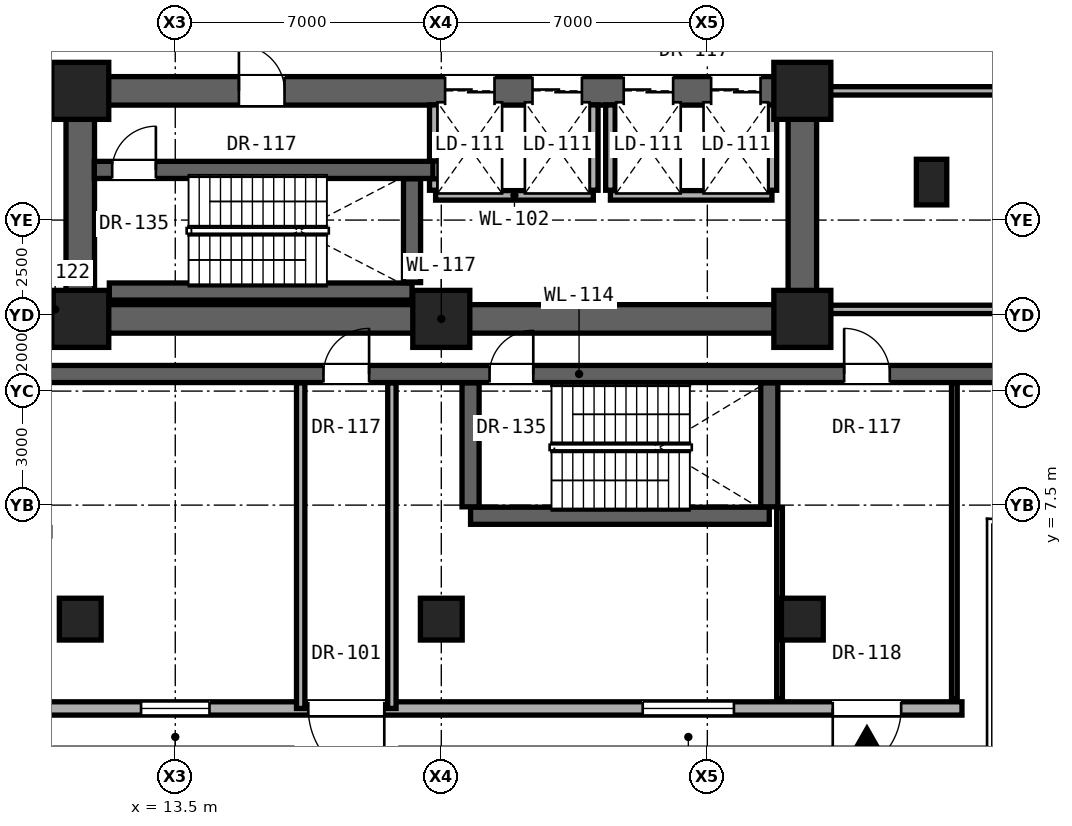
"""IFC4 building model, lengths in metres.
Left out: names, types, materials, properties, quantities, classifications, styles, units other than length and angle.
Written with IfcOpenShell. Run it as: python <this file> out.ifc"""

import sys

from ifc_helpers import new_model, si_unit, direction, frame, frame_2d, origin, origin_2d, place, context, subcontext, project, spatial, rectangle, extrude, element, fill, save


model = new_model("IFC4")
c1 = context("Model", 3, precision=1e-05, world=origin(), true_north=direction((0.0, 1.0)))
c2 = subcontext(c1, "Body", "Model", "MODEL_VIEW")
j1 = project(units=[si_unit("LENGTHUNIT", "METRE"), si_unit("PLANEANGLEUNIT", "RADIAN")], contexts=[c1])
p1 = place(None, origin())
s1 = spatial("IfcSite", under=j1, at=p1, CompositionType="ELEMENT")
p2 = place(p1, origin())
s2 = spatial("IfcBuilding", under=s1, at=p2, CompositionType="ELEMENT")
p3 = place(p2, origin())
s3 = spatial("IfcBuildingStorey", under=s2, at=p3, CompositionType="ELEMENT", Elevation=0.0)
for number, where, z_axis, x_axis in (
    (1, (11.0, 12.4, 0.0), (0.0, 0.0, 1.0), (1.0, 0.0, 0.0)),
    (2, (20.5, 12.4, 0.0), (0.0, 0.0, 1.0), (1.0, 0.0, 0.0)),
    (3, (30.0, 12.4, 0.0), (0.0, 0.0, 1.0), (1.0, 0.0, 0.0)),
    (4, (11.0, 18.4, 0.0), (0.0, 0.0, 1.0), (1.0, 0.0, 0.0)),
    (5, (30.0, 18.4, 0.0), (0.0, 0.0, 1.0), (1.0, 0.0, 0.0)),
):
    element("IfcColumn", number, at=place(p3, frame(where, z_axis=z_axis, x_axis=x_axis)), inside=s3, PredefinedType="COLUMN", context=c2, shape_type="SweptSolid", body=[
        extrude(rectangle(XDim=1.5, YDim=1.5, at=origin_2d()), origin(), (0.0, 0.0, 1.0), 5.2),
    ])
p4 = place(p3, frame((33.4, 16.0, 0.0), z_axis=(0.0, 0.0, 1.0), x_axis=(1.0, 0.0, 0.0)))
e6 = element("IfcColumn", 6, at=p4, inside=s3, PredefinedType="PILASTER", context=c2, shape_type="SweptSolid", body=[
    extrude(rectangle(XDim=0.8, YDim=1.2, at=origin_2d()), origin(), (0.0, 0.0, 1.0), 5.2),
])
p5 = place(p3, frame((11.0, 12.4, 0.0), z_axis=(0.0, 0.0, 1.0), x_axis=(1.0, 0.0, 0.0)))
e7 = element("IfcWall", 7, at=p5, inside=s3, PredefinedType="SHEAR", context=c2, shape_type="SweptSolid", body=[
    extrude(rectangle(XDim=19.0, YDim=0.75, at=frame_2d((9.5, 0.0))), origin(), (0.0, 0.0, 1.0), 4.88),
])
for number, where, z_axis, x_axis in (
    (8, (11.0, 12.4, 0.0), (0.0, 0.0, 1.0), (0.0, 1.0, 0.0)),
    (9, (30.0, 12.4, 0.0), (0.0, 0.0, 1.0), (0.0, 1.0, 0.0)),
):
    element("IfcWall", number, at=place(p3, frame(where, z_axis=z_axis, x_axis=x_axis)), inside=s3, PredefinedType="SHEAR", context=c2, shape_type="SweptSolid", body=[
        extrude(rectangle(XDim=6.0, YDim=0.75, at=frame_2d((3.0, 0.0))), origin(), (0.0, 0.0, 1.0), 4.88),
    ])
p6 = place(p3, frame((11.0, 18.4, 0.0), z_axis=(0.0, 0.0, 1.0), x_axis=(1.0, 0.0, 0.0)))
e10 = element("IfcWall", 10, at=p6, inside=s3, PredefinedType="SHEAR", context=c2, shape_type="SweptSolid", body=[
    extrude(rectangle(XDim=19.0, YDim=0.75, at=frame_2d((9.5, 0.0))), origin(), (0.0, 0.0, 1.0), 4.88),
])
p7 = place(p6, frame((4.175, 0.0, 0.0)))
e11 = element("IfcOpeningElement", 11, at=p7, cuts=e10, PredefinedType="OPENING", context=c2, shape_type="SweptSolid", body=[
    extrude(rectangle(XDim=1.2, YDim=2.25, at=frame_2d((0.6, 1.125))), frame((0.0, 0.385, 0.0), z_axis=(0.0, -1.0, 0.0), x_axis=(1.0, 0.0, 0.0)), (0.0, 0.0, 1.0), 0.77),
])
p8 = place(p6, frame((9.6, 0.0, 0.0)))
e12 = element("IfcOpeningElement", 12, at=p8, cuts=e10, PredefinedType="OPENING", context=c2, shape_type="SweptSolid", body=[
    extrude(rectangle(XDim=1.3, YDim=2.3, at=frame_2d((0.65, 1.15))), frame((0.0, 0.385, 0.0), z_axis=(0.0, -1.0, 0.0), x_axis=(1.0, 0.0, 0.0)), (0.0, 0.0, 1.0), 0.77),
])
p9 = place(p6, frame((11.9, 0.0, 0.0)))
e13 = element("IfcOpeningElement", 13, at=p9, cuts=e10, PredefinedType="OPENING", context=c2, shape_type="SweptSolid", body=[
    extrude(rectangle(XDim=1.3, YDim=2.3, at=frame_2d((0.65, 1.15))), frame((0.0, 0.385, 0.0), z_axis=(0.0, -1.0, 0.0), x_axis=(1.0, 0.0, 0.0)), (0.0, 0.0, 1.0), 0.77),
])
p10 = place(p6, frame((14.3, 0.0, 0.0)))
e14 = element("IfcOpeningElement", 14, at=p10, cuts=e10, PredefinedType="OPENING", context=c2, shape_type="SweptSolid", body=[
    extrude(rectangle(XDim=1.3, YDim=2.3, at=frame_2d((0.65, 1.15))), frame((0.0, 0.385, 0.0), z_axis=(0.0, -1.0, 0.0), x_axis=(1.0, 0.0, 0.0)), (0.0, 0.0, 1.0), 0.77),
])
p11 = place(p6, frame((16.6, 0.0, 0.0)))
e15 = element("IfcOpeningElement", 15, at=p11, cuts=e10, PredefinedType="OPENING", context=c2, shape_type="SweptSolid", body=[
    extrude(rectangle(XDim=1.3, YDim=2.3, at=frame_2d((0.65, 1.15))), frame((0.0, 0.385, 0.0), z_axis=(0.0, -1.0, 0.0), x_axis=(1.0, 0.0, 0.0)), (0.0, 0.0, 1.0), 0.77),
])
for number, where, z_axis, x_axis in (
    (16, (11.0, 4.5, 0.0), (0.0, 0.0, 1.0), (1.0, 0.0, 0.0)),
    (17, (20.5, 4.5, 0.0), (0.0, 0.0, 1.0), (1.0, 0.0, 0.0)),
    (18, (30.0, 4.5, 0.0), (0.0, 0.0, 1.0), (1.0, 0.0, 0.0)),
):
    element("IfcColumn", number, at=place(p3, frame(where, z_axis=z_axis, x_axis=x_axis)), inside=s3, PredefinedType="COLUMN", context=c2, shape_type="SweptSolid", body=[
        extrude(rectangle(XDim=1.1, YDim=1.1, at=origin_2d()), origin(), (0.0, 0.0, 1.0), 5.2),
    ])
p12 = place(p3, frame((34.2, 2.15, 0.0), z_axis=(0.0, 0.0, 1.0), x_axis=(-1.0, 0.0, 0.0)))
e19 = element("IfcWall", 19, at=p12, inside=s3, PredefinedType="SOLIDWALL", context=c2, shape_type="SweptSolid", body=[
    extrude(rectangle(XDim=27.0, YDim=0.35, at=frame_2d((13.5, 0.0))), origin(), (0.0, 0.0, 1.0), 4.86),
])
p13 = place(p12, frame((6.0, 0.0, 0.85)))
e20 = element("IfcOpeningElement", 20, at=p13, cuts=e19, PredefinedType="OPENING", context=c2, shape_type="SweptSolid", body=[
    extrude(rectangle(XDim=2.4, YDim=2.6, at=frame_2d((1.2, 1.3))), frame((0.0, 0.185, 0.0), z_axis=(0.0, -1.0, 0.0), x_axis=(1.0, 0.0, 0.0)), (0.0, 0.0, 1.0), 0.37),
])
p14 = place(p12, frame((19.8, 0.0, 0.85)))
e21 = element("IfcOpeningElement", 21, at=p14, cuts=e19, PredefinedType="OPENING", context=c2, shape_type="SweptSolid", body=[
    extrude(rectangle(XDim=1.8, YDim=2.4, at=frame_2d((0.9, 1.2))), frame((0.0, 0.185, 0.0), z_axis=(0.0, -1.0, 0.0), x_axis=(1.0, 0.0, 0.0)), (0.0, 0.0, 1.0), 0.37),
])
p15 = place(p12, frame((1.6, 0.0, 0.0)))
e22 = element("IfcOpeningElement", 22, at=p15, cuts=e19, PredefinedType="OPENING", context=c2, shape_type="SweptSolid", body=[
    extrude(rectangle(XDim=1.8, YDim=2.5, at=frame_2d((0.9, 1.25))), frame((0.0, 0.185, 0.0), z_axis=(0.0, -1.0, 0.0), x_axis=(1.0, 0.0, 0.0)), (0.0, 0.0, 1.0), 0.37),
])
p16 = place(p12, frame((15.2, 0.0, 0.0)))
e23 = element("IfcOpeningElement", 23, at=p16, cuts=e19, PredefinedType="OPENING", context=c2, shape_type="SweptSolid", body=[
    extrude(rectangle(XDim=2.0, YDim=2.4, at=frame_2d((1.0, 1.2))), frame((0.0, 0.185, 0.0), z_axis=(0.0, -1.0, 0.0), x_axis=(1.0, 0.0, 0.0)), (0.0, 0.0, 1.0), 0.37),
])
p17 = place(p12, frame((24.41, 0.0, 0.0)))
e24 = element("IfcOpeningElement", 24, at=p17, cuts=e19, PredefinedType="OPENING", context=c2, shape_type="SweptSolid", body=[
    extrude(rectangle(XDim=2.0, YDim=2.4, at=frame_2d((1.0, 1.2))), frame((0.0, 0.185, 0.0), z_axis=(0.0, -1.0, 0.0), x_axis=(1.0, 0.0, 0.0)), (0.0, 0.0, 1.0), 0.37),
])
p18 = place(p3, frame((21.27, 7.22, 0.0), z_axis=(0.0, 0.0, 1.0), x_axis=(1.0, 0.0, 0.0)))
e25 = element("IfcWall", 25, at=p18, inside=s3, PredefinedType="SHEAR", context=c2, shape_type="SweptSolid", body=[
    extrude(rectangle(XDim=7.86, YDim=0.45, at=frame_2d((3.93, 0.0))), origin(), (0.0, 0.0, 1.0), 4.88),
])
p19 = place(p3, frame((10.05, 10.95, 0.0), z_axis=(0.0, 0.0, 1.0), x_axis=(1.0, 0.0, 0.0)))
e26 = element("IfcWall", 26, at=p19, inside=s3, PredefinedType="SHEAR", context=c2, shape_type="SweptSolid", body=[
    extrude(rectangle(XDim=28.15, YDim=0.45, at=frame_2d((14.075, 0.0))), origin(), (0.0, 0.0, 1.0), 4.88),
])
p20 = place(p19, frame((7.35, 0.0, 0.0)))
e27 = element("IfcOpeningElement", 27, at=p20, cuts=e26, PredefinedType="OPENING", context=c2, shape_type="SweptSolid", body=[
    extrude(rectangle(XDim=1.2, YDim=2.25, at=frame_2d((0.6, 1.125))), frame((0.0, 0.235, 0.0), z_axis=(0.0, -1.0, 0.0), x_axis=(1.0, 0.0, 0.0)), (0.0, 0.0, 1.0), 0.47),
])
p21 = place(p19, frame((11.72, 0.0, 0.0)))
e28 = element("IfcOpeningElement", 28, at=p21, cuts=e26, PredefinedType="OPENING", context=c2, shape_type="SweptSolid", body=[
    extrude(rectangle(XDim=1.15, YDim=2.2, at=frame_2d((0.575, 1.1))), frame((0.0, 0.235, 0.0), z_axis=(0.0, -1.0, 0.0), x_axis=(1.0, 0.0, 0.0)), (0.0, 0.0, 1.0), 0.47),
])
p22 = place(p19, frame((21.05, 0.0, 0.0)))
e29 = element("IfcOpeningElement", 29, at=p22, cuts=e26, PredefinedType="OPENING", context=c2, shape_type="SweptSolid", body=[
    extrude(rectangle(XDim=1.2, YDim=2.25, at=frame_2d((0.6, 1.125))), frame((0.0, 0.235, 0.0), z_axis=(0.0, -1.0, 0.0), x_axis=(1.0, 0.0, 0.0)), (0.0, 0.0, 1.0), 0.47),
])
p23 = place(p3, frame((10.05, 12.65, 0.0), z_axis=(0.0, 0.0, 1.0), x_axis=(1.0, 0.0, 0.0)))
e30 = element("IfcWall", 30, at=p23, inside=s3, PredefinedType="SOLIDWALL", context=c2, shape_type="SweptSolid", body=[
    extrude(rectangle(XDim=0.58, YDim=0.22, at=frame_2d((0.29, 0.0))), origin(), (0.0, 0.0, 1.0), 4.88),
])
p24 = place(p3, frame((30.37, 12.65, 0.0), z_axis=(0.0, 0.0, 1.0), x_axis=(1.0, 0.0, 0.0)))
e31 = element("IfcWall", 31, at=p24, inside=s3, PredefinedType="SOLIDWALL", context=c2, shape_type="SweptSolid", body=[
    extrude(rectangle(XDim=7.83, YDim=0.22, at=frame_2d((3.915, 0.0))), origin(), (0.0, 0.0, 1.0), 3.924),
])
p25 = place(p3, frame((11.765, 13.12, 0.0), z_axis=(0.0, 0.0, 1.0), x_axis=(1.0, 0.0, 0.0)))
e32 = element("IfcWall", 32, at=p25, inside=s3, PredefinedType="SHEAR", context=c2, shape_type="SweptSolid", body=[
    extrude(rectangle(XDim=7.965, YDim=0.45, at=frame_2d((3.982, 0.0))), origin(), (0.0, 0.0, 1.0), 4.88),
])
p26 = place(p3, frame((20.35, 15.65, 0.0), z_axis=(0.0, 0.0, 1.0), x_axis=(1.0, 0.0, 0.0)))
e33 = element("IfcWall", 33, at=p26, inside=s3, PredefinedType="SOLIDWALL", context=c2, shape_type="SweptSolid", body=[
    extrude(rectangle(XDim=4.15, YDim=0.25, at=frame_2d((2.075, 0.0))), origin(), (0.0, 0.0, 1.0), 4.88),
])
p27 = place(p3, frame((24.95, 15.65, 0.0), z_axis=(0.0, 0.0, 1.0), x_axis=(1.0, 0.0, 0.0)))
e34 = element("IfcWall", 34, at=p27, inside=s3, PredefinedType="SOLIDWALL", context=c2, shape_type="SweptSolid", body=[
    extrude(rectangle(XDim=4.25, YDim=0.25, at=frame_2d((2.125, 0.0))), origin(), (0.0, 0.0, 1.0), 4.88),
])
p28 = place(p3, frame((11.37, 16.32, 0.0), z_axis=(0.0, 0.0, 1.0), x_axis=(1.0, 0.0, 0.0)))
e35 = element("IfcWall", 35, at=p28, inside=s3, PredefinedType="SHEAR", context=c2, shape_type="SweptSolid", body=[
    extrude(rectangle(XDim=8.91, YDim=0.45, at=frame_2d((4.455, 0.0))), origin(), (0.0, 0.0, 1.0), 4.88),
])
p29 = place(p28, frame((0.47, 0.0, 0.0)))
e36 = element("IfcOpeningElement", 36, at=p29, cuts=e35, PredefinedType="OPENING", context=c2, shape_type="SweptSolid", body=[
    extrude(rectangle(XDim=1.15, YDim=2.2, at=frame_2d((0.575, 1.1))), frame((0.0, 0.235, 0.0), z_axis=(0.0, -1.0, 0.0), x_axis=(1.0, 0.0, 0.0)), (0.0, 0.0, 1.0), 0.47),
])
p30 = place(p3, frame((10.05, 18.4, 0.0), z_axis=(0.0, 0.0, 1.0), x_axis=(1.0, 0.0, 0.0)))
e37 = element("IfcWall", 37, at=p30, inside=s3, PredefinedType="SOLIDWALL", context=c2, shape_type="SweptSolid", body=[
    extrude(rectangle(XDim=0.58, YDim=0.22, at=frame_2d((0.29, 0.0))), origin(), (0.0, 0.0, 1.0), 3.772),
])
p31 = place(p3, frame((30.37, 18.4, 0.0), z_axis=(0.0, 0.0, 1.0), x_axis=(1.0, 0.0, 0.0)))
e38 = element("IfcWall", 38, at=p31, inside=s3, PredefinedType="SOLIDWALL", context=c2, shape_type="SweptSolid", body=[
    extrude(rectangle(XDim=10.03, YDim=0.22, at=frame_2d((5.015, 0.0))), origin(), (0.0, 0.0, 1.0), 3.772),
])
for number, where, z_axis, x_axis in (
    (39, (16.8, 2.15, 0.0), (0.0, 0.0, 1.0), (0.0, 1.0, 0.0)),
    (40, (19.2, 2.15, 0.0), (0.0, 0.0, 1.0), (0.0, 1.0, 0.0)),
):
    element("IfcWall", number, at=place(p3, frame(where, z_axis=z_axis, x_axis=x_axis)), inside=s3, PredefinedType="SOLIDWALL", context=c2, shape_type="SweptSolid", body=[
        extrude(rectangle(XDim=8.565, YDim=0.22, at=frame_2d((4.283, 0.0))), origin(), (0.0, 0.0, 1.0), 4.099),
    ])
p32 = place(p3, frame((19.73, 13.355, 0.0), z_axis=(0.0, 0.0, 1.0), x_axis=(0.0, 1.0, 0.0)))
e41 = element("IfcWall", 41, at=p32, inside=s3, PredefinedType="SHEAR", context=c2, shape_type="SweptSolid", body=[
    extrude(rectangle(XDim=2.73, YDim=0.45, at=frame_2d((1.365, 0.0))), origin(), (0.0, 0.0, 1.0), 4.88),
])
p33 = place(p3, frame((20.315, 15.785, 0.0), z_axis=(0.0, 0.0, 1.0), x_axis=(0.0, 1.0, 0.0)))
e42 = element("IfcWall", 42, at=p33, inside=s3, PredefinedType="SOLIDWALL", context=c2, shape_type="SweptSolid", body=[
    extrude(rectangle(XDim=0.3, YDim=0.25, at=frame_2d((0.15, 0.0))), origin(), (0.0, 0.0, 1.0), 4.88),
])
p34 = place(p3, frame((20.315, 16.555, 0.0), z_axis=(0.0, 0.0, 1.0), x_axis=(0.0, 1.0, 0.0)))
e43 = element("IfcWall", 43, at=p34, inside=s3, PredefinedType="SOLIDWALL", context=c2, shape_type="SweptSolid", body=[
    extrude(rectangle(XDim=1.475, YDim=0.25, at=frame_2d((0.738, 0.0))), origin(), (0.0, 0.0, 1.0), 4.88),
])
p35 = place(p3, frame((21.27, 7.455, 0.0), z_axis=(0.0, 0.0, 1.0), x_axis=(0.0, 1.0, 0.0)))
e44 = element("IfcWall", 44, at=p35, inside=s3, PredefinedType="SHEAR", context=c2, shape_type="SweptSolid", body=[
    extrude(rectangle(XDim=3.26, YDim=0.45, at=frame_2d((1.63, 0.0))), origin(), (0.0, 0.0, 1.0), 4.88),
])
for number, where, z_axis, x_axis in (
    (45, (24.5, 15.785, 0.0), (0.0, 0.0, 1.0), (0.0, 1.0, 0.0)),
    (46, (24.95, 15.785, 0.0), (0.0, 0.0, 1.0), (0.0, 1.0, 0.0)),
):
    element("IfcWall", number, at=place(p3, frame(where, z_axis=z_axis, x_axis=x_axis)), inside=s3, PredefinedType="SOLIDWALL", context=c2, shape_type="SweptSolid", body=[
        extrude(rectangle(XDim=2.245, YDim=0.25, at=frame_2d((1.123, 0.0))), origin(), (0.0, 0.0, 1.0), 4.88),
    ])
p36 = place(p3, frame((29.13, 7.455, 0.0), z_axis=(0.0, 0.0, 1.0), x_axis=(0.0, 1.0, 0.0)))
e47 = element("IfcWall", 47, at=p36, inside=s3, PredefinedType="SHEAR", context=c2, shape_type="SweptSolid", body=[
    extrude(rectangle(XDim=3.26, YDim=0.45, at=frame_2d((1.63, 0.0))), origin(), (0.0, 0.0, 1.0), 4.88),
])
p37 = place(p3, frame((29.2, 15.785, 0.0), z_axis=(0.0, 0.0, 1.0), x_axis=(0.0, 1.0, 0.0)))
e48 = element("IfcWall", 48, at=p37, inside=s3, PredefinedType="SOLIDWALL", context=c2, shape_type="SweptSolid", body=[
    extrude(rectangle(XDim=2.245, YDim=0.25, at=frame_2d((1.123, 0.0))), origin(), (0.0, 0.0, 1.0), 4.88),
])
p38 = place(p3, frame((29.4, 2.4, 0.0), z_axis=(0.0, 0.0, 1.0), x_axis=(0.0, 1.0, 0.0)))
e49 = element("IfcWall", 49, at=p38, inside=s3, PredefinedType="PARTITIONING", context=c2, shape_type="SweptSolid", body=[
    extrude(rectangle(XDim=5.035, YDim=0.15, at=frame_2d((2.518, 0.0))), origin(), (0.0, 0.0, 1.0), 4.099),
])
p39 = place(p3, frame((34.0, 2.4, 0.0), z_axis=(0.0, 0.0, 1.0), x_axis=(0.0, 1.0, 0.0)))
e50 = element("IfcWall", 50, at=p39, inside=s3, PredefinedType="PARTITIONING", context=c2, shape_type="SweptSolid", body=[
    extrude(rectangle(XDim=8.315, YDim=0.15, at=frame_2d((4.158, 0.0))), origin(), (0.0, 0.0, 1.0), 4.099),
])
p40 = place(p13, origin())
e51 = element("IfcWindow", 51, at=p40, inside=s3, PartitioningType="SINGLE_PANEL", PredefinedType="WINDOW", context=c2, shape_type="SweptSolid", body=[
    extrude(rectangle(XDim=2.4, YDim=2.6, at=frame_2d((1.2, 1.3))), frame((0.0, 0.03, 0.0), z_axis=(0.0, -1.0, 0.0), x_axis=(1.0, 0.0, 0.0)), (0.0, 0.0, 1.0), 0.06),
])
fill(e20, e51)
p41 = place(p14, origin())
e52 = element("IfcWindow", 52, at=p41, inside=s3, PartitioningType="SINGLE_PANEL", PredefinedType="WINDOW", context=c2, shape_type="SweptSolid", body=[
    extrude(rectangle(XDim=1.8, YDim=2.4, at=frame_2d((0.9, 1.2))), frame((0.0, 0.03, 0.0), z_axis=(0.0, -1.0, 0.0), x_axis=(1.0, 0.0, 0.0)), (0.0, 0.0, 1.0), 0.06),
])
fill(e21, e52)
p42 = place(p15, origin())
e53 = element("IfcDoor", 53, at=p42, inside=s3, OperationType="SINGLE_SWING_RIGHT", PredefinedType="DOOR", context=c2, shape_type="SweptSolid", body=[
    extrude(rectangle(XDim=1.8, YDim=2.5, at=frame_2d((0.9, 1.25))), frame((0.0, 0.025, 0.0), z_axis=(0.0, -1.0, 0.0), x_axis=(1.0, 0.0, 0.0)), (0.0, 0.0, 1.0), 0.05),
])
fill(e22, e53)
p43 = place(p16, origin())
e54 = element("IfcDoor", 54, at=p43, inside=s3, OperationType="SINGLE_SWING_LEFT", PredefinedType="DOOR", context=c2, shape_type="SweptSolid", body=[
    extrude(rectangle(XDim=2.0, YDim=2.4, at=frame_2d((1.0, 1.2))), frame((0.0, 0.025, 0.0), z_axis=(0.0, -1.0, 0.0), x_axis=(1.0, 0.0, 0.0)), (0.0, 0.0, 1.0), 0.05),
])
fill(e23, e54)
p44 = place(p7, origin())
e55 = element("IfcDoor", 55, at=p44, inside=s3, OperationType="SINGLE_SWING_LEFT", PredefinedType="DOOR", context=c2, shape_type="SweptSolid", body=[
    extrude(rectangle(XDim=1.2, YDim=2.25, at=frame_2d((0.6, 1.125))), frame((0.0, 0.025, 0.0), z_axis=(0.0, -1.0, 0.0), x_axis=(1.0, 0.0, 0.0)), (0.0, 0.0, 1.0), 0.05),
])
fill(e11, e55)
p45 = place(p29, origin())
e56 = element("IfcDoor", 56, at=p45, inside=s3, OperationType="SINGLE_SWING_RIGHT", PredefinedType="DOOR", context=c2, shape_type="SweptSolid", body=[
    extrude(rectangle(XDim=1.15, YDim=2.2, at=frame_2d((0.575, 1.1))), frame((0.0, 0.025, 0.0), z_axis=(0.0, -1.0, 0.0), x_axis=(1.0, 0.0, 0.0)), (0.0, 0.0, 1.0), 0.05),
])
fill(e36, e56)
p46 = place(p20, origin())
e57 = element("IfcDoor", 57, at=p46, inside=s3, OperationType="SINGLE_SWING_RIGHT", PredefinedType="DOOR", context=c2, shape_type="SweptSolid", body=[
    extrude(rectangle(XDim=1.2, YDim=2.25, at=frame_2d((0.6, 1.125))), frame((0.0, 0.025, 0.0), z_axis=(0.0, -1.0, 0.0), x_axis=(1.0, 0.0, 0.0)), (0.0, 0.0, 1.0), 0.05),
])
fill(e27, e57)
p47 = place(p21, origin())
e58 = element("IfcDoor", 58, at=p47, inside=s3, OperationType="SINGLE_SWING_RIGHT", PredefinedType="DOOR", context=c2, shape_type="SweptSolid", body=[
    extrude(rectangle(XDim=1.15, YDim=2.2, at=frame_2d((0.575, 1.1))), frame((0.0, 0.025, 0.0), z_axis=(0.0, -1.0, 0.0), x_axis=(1.0, 0.0, 0.0)), (0.0, 0.0, 1.0), 0.05),
])
fill(e28, e58)
p48 = place(p22, origin())
e59 = element("IfcDoor", 59, at=p48, inside=s3, OperationType="SINGLE_SWING_LEFT", PredefinedType="DOOR", context=c2, shape_type="SweptSolid", body=[
    extrude(rectangle(XDim=1.2, YDim=2.25, at=frame_2d((0.6, 1.125))), frame((0.0, 0.025, 0.0), z_axis=(0.0, -1.0, 0.0), x_axis=(1.0, 0.0, 0.0)), (0.0, 0.0, 1.0), 0.05),
])
fill(e29, e59)
p49 = place(p8, origin())
e60 = element("IfcDoor", 60, at=p49, inside=s3, OperationType="DOUBLE_DOOR_SLIDING", PredefinedType="DOOR", context=c2, shape_type="SweptSolid", body=[
    extrude(rectangle(XDim=1.3, YDim=2.3, at=frame_2d((0.65, 1.15))), frame((0.0, 0.025, 0.0), z_axis=(0.0, -1.0, 0.0), x_axis=(1.0, 0.0, 0.0)), (0.0, 0.0, 1.0), 0.05),
])
fill(e12, e60)
p50 = place(p9, origin())
e61 = element("IfcDoor", 61, at=p50, inside=s3, OperationType="DOUBLE_DOOR_SLIDING", PredefinedType="DOOR", context=c2, shape_type="SweptSolid", body=[
    extrude(rectangle(XDim=1.3, YDim=2.3, at=frame_2d((0.65, 1.15))), frame((0.0, 0.025, 0.0), z_axis=(0.0, -1.0, 0.0), x_axis=(1.0, 0.0, 0.0)), (0.0, 0.0, 1.0), 0.05),
])
fill(e13, e61)
p51 = place(p10, origin())
e62 = element("IfcDoor", 62, at=p51, inside=s3, OperationType="DOUBLE_DOOR_SLIDING", PredefinedType="DOOR", context=c2, shape_type="SweptSolid", body=[
    extrude(rectangle(XDim=1.3, YDim=2.3, at=frame_2d((0.65, 1.15))), frame((0.0, 0.025, 0.0), z_axis=(0.0, -1.0, 0.0), x_axis=(1.0, 0.0, 0.0)), (0.0, 0.0, 1.0), 0.05),
])
fill(e14, e62)
p52 = place(p11, origin())
e63 = element("IfcDoor", 63, at=p52, inside=s3, OperationType="DOUBLE_DOOR_SLIDING", PredefinedType="DOOR", context=c2, shape_type="SweptSolid", body=[
    extrude(rectangle(XDim=1.3, YDim=2.3, at=frame_2d((0.65, 1.15))), frame((0.0, 0.025, 0.0), z_axis=(0.0, -1.0, 0.0), x_axis=(1.0, 0.0, 0.0)), (0.0, 0.0, 1.0), 0.05),
])
fill(e15, e63)
save(model, sys.argv[1])
